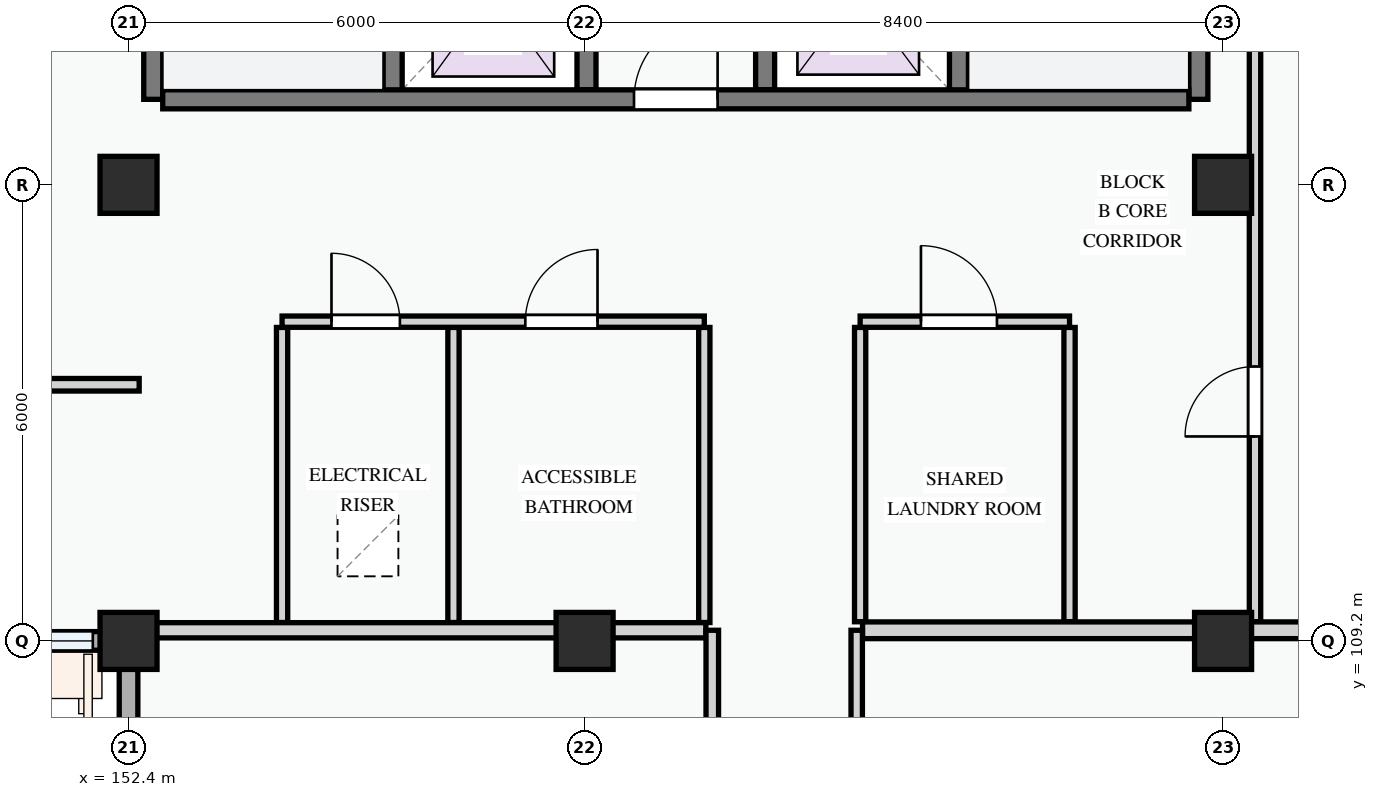
"""IFC4 building model, lengths in metres.
Left out: names, types, materials, properties, quantities, classifications, styles, units other than length and angle.
Written with IfcOpenShell. Run it as: python <this file> out.ifc"""

import sys

from ifc_helpers import new_model, si_unit, direction, frame, frame_2d, origin, origin_2d, place, context, subcontext, project, spatial, rectangle, extrude, element, fill, save


model = new_model("IFC4")
c1 = context("Model", 3, precision=1e-05, world=origin(), true_north=direction((0.0, 1.0)))
c2 = subcontext(c1, "Body", "Model", "MODEL_VIEW")
j1 = project(units=[si_unit("LENGTHUNIT", "METRE"), si_unit("PLANEANGLEUNIT", "RADIAN")], contexts=[c1])
p1 = place(None, origin())
s1 = spatial("IfcSite", under=j1, at=p1, CompositionType="ELEMENT")
p2 = place(p1, origin())
s2 = spatial("IfcBuilding", under=s1, at=p2, CompositionType="ELEMENT")
p3 = place(p2, frame((0.0, 0.0, 4.5)))
s3 = spatial("IfcBuildingStorey", under=s2, at=p3, CompositionType="ELEMENT", Elevation=4.5)
for number, where, z_axis, x_axis in (
    (1, (152.4, 109.2, 0.0), (0.0, 0.0, 1.0), (1.0, 0.0, 0.0)),
    (2, (152.4, 115.2, 0.0), (0.0, 0.0, 1.0), (1.0, 0.0, 0.0)),
    (3, (158.4, 109.2, 0.0), (0.0, 0.0, 1.0), (1.0, 0.0, 0.0)),
    (4, (166.8, 109.2, 0.0), (0.0, 0.0, 1.0), (1.0, 0.0, 0.0)),
    (5, (166.8, 115.2, 0.0), (0.0, 0.0, 1.0), (1.0, 0.0, 0.0)),
):
    element("IfcColumn", number, at=place(p3, frame(where, z_axis=z_axis, x_axis=x_axis)), inside=s3, PredefinedType="COLUMN", context=c2, shape_type="SweptSolid", body=[
        extrude(rectangle(XDim=0.75, YDim=0.75, at=origin_2d()), origin(), (0.0, 0.0, 1.0), 3.6),
    ])
p4 = place(p3, frame((144.0, 109.2, 0.0), z_axis=(0.0, 0.0, 1.0), x_axis=(1.0, 0.0, 0.0)))
e6 = element("IfcWall", 6, at=p4, inside=s3, PredefinedType="STANDARD", context=c2, shape_type="SweptSolid", body=[
    extrude(rectangle(XDim=8.4, YDim=0.245, at=frame_2d((4.2, 0.0))), origin(), (0.0, 0.0, 1.0), 2.675),
])
p5 = place(p4, frame((1.015, 0.0, 0.78)))
e7 = element("IfcOpeningElement", 7, at=p5, cuts=e6, PredefinedType="OPENING", context=c2, shape_type="SweptSolid", body=[
    extrude(rectangle(XDim=1.35, YDim=1.55, at=frame_2d((0.675, 0.775))), frame((0.0, 0.133, 0.0), z_axis=(0.0, -1.0, 0.0), x_axis=(1.0, 0.0, 0.0)), (0.0, 0.0, 1.0), 0.265),
])
p6 = place(p4, frame((3.75, 0.0, 0.78)))
e8 = element("IfcOpeningElement", 8, at=p6, cuts=e6, PredefinedType="OPENING", context=c2, shape_type="SweptSolid", body=[
    extrude(rectangle(XDim=1.6, YDim=1.75, at=frame_2d((0.8, 0.875))), frame((0.0, 0.133, 0.0), z_axis=(0.0, -1.0, 0.0), x_axis=(1.0, 0.0, 0.0)), (0.0, 0.0, 1.0), 0.265),
])
p7 = place(p4, frame((6.33, 0.0, 0.78)))
e9 = element("IfcOpeningElement", 9, at=p7, cuts=e6, PredefinedType="OPENING", context=c2, shape_type="SweptSolid", body=[
    extrude(rectangle(XDim=1.6, YDim=1.75, at=frame_2d((0.8, 0.875))), frame((0.0, 0.133, 0.0), z_axis=(0.0, -1.0, 0.0), x_axis=(1.0, 0.0, 0.0)), (0.0, 0.0, 1.0), 0.265),
])
p8 = place(p3, frame((152.4, 109.2, 0.0), z_axis=(0.0, 0.0, 1.0), x_axis=(0.0, -1.0, 0.0)))
e10 = element("IfcWall", 10, at=p8, inside=s3, PredefinedType="STANDARD", context=c2, shape_type="SweptSolid", body=[
    extrude(rectangle(XDim=8.4, YDim=0.245, at=frame_2d((4.2, 0.0))), origin(), (0.0, 0.0, 1.0), 2.725),
])
p9 = place(p8, frame((1.28, 0.0, 0.78)))
e11 = element("IfcOpeningElement", 11, at=p9, cuts=e10, PredefinedType="OPENING", context=c2, shape_type="SweptSolid", body=[
    extrude(rectangle(XDim=1.9, YDim=1.55, at=frame_2d((0.95, 0.775))), frame((0.0, 0.133, 0.0), z_axis=(0.0, -1.0, 0.0), x_axis=(1.0, 0.0, 0.0)), (0.0, 0.0, 1.0), 0.265),
])
p10 = place(p8, frame((5.095, 0.0, 0.78)))
e12 = element("IfcOpeningElement", 12, at=p10, cuts=e10, PredefinedType="OPENING", context=c2, shape_type="SweptSolid", body=[
    extrude(rectangle(XDim=2.15, YDim=1.65, at=frame_2d((1.075, 0.825))), frame((0.0, 0.133, 0.0), z_axis=(0.0, -1.0, 0.0), x_axis=(1.0, 0.0, 0.0)), (0.0, 0.0, 1.0), 0.265),
])
p11 = place(p3, frame((155.875, 123.25, 0.0), z_axis=(0.0, 0.0, 1.0), x_axis=(0.0, -1.0, 0.0)))
e13 = element("IfcWall", 13, at=p11, inside=s3, PredefinedType="SHEAR", context=c2, shape_type="SweptSolid", body=[
    extrude(rectangle(XDim=6.925, YDim=0.25, at=frame_2d((3.462, 0.0))), origin(), (0.0, 0.0, 1.0), 3.3),
])
p12 = place(p11, frame((0.35, 0.0, 0.0)))
e14 = element("IfcOpeningElement", 14, at=p12, cuts=e13, PredefinedType="OPENING", context=c2, shape_type="SweptSolid", body=[
    extrude(rectangle(XDim=0.95, YDim=2.1, at=frame_2d((0.475, 1.05))), frame((0.0, 0.135, 0.0), z_axis=(0.0, -1.0, 0.0), x_axis=(1.0, 0.0, 0.0)), (0.0, 0.0, 1.0), 0.27),
])
p13 = place(p3, frame((152.725, 123.4, 0.0), z_axis=(0.0, 0.0, 1.0), x_axis=(0.0, -1.0, 0.0)))
e15 = element("IfcWall", 15, at=p13, inside=s3, PredefinedType="SHEAR", context=c2, shape_type="SweptSolid", body=[
    extrude(rectangle(XDim=7.075, YDim=0.25, at=frame_2d((3.538, 0.0))), origin(), (0.0, 0.0, 1.0), 3.3),
])
p14 = place(p3, frame((166.475, 123.25, 0.0), z_axis=(0.0, 0.0, 1.0), x_axis=(0.0, -1.0, 0.0)))
e16 = element("IfcWall", 16, at=p14, inside=s3, PredefinedType="SHEAR", context=c2, shape_type="SweptSolid", body=[
    extrude(rectangle(XDim=6.925, YDim=0.25, at=frame_2d((3.462, 0.0))), origin(), (0.0, 0.0, 1.0), 3.3),
])
p15 = place(p3, frame((163.325, 123.25, 0.0), z_axis=(0.0, 0.0, 1.0), x_axis=(0.0, -1.0, 0.0)))
e17 = element("IfcWall", 17, at=p15, inside=s3, PredefinedType="SHEAR", context=c2, shape_type="SweptSolid", body=[
    extrude(rectangle(XDim=6.925, YDim=0.25, at=frame_2d((3.462, 0.0))), origin(), (0.0, 0.0, 1.0), 3.3),
])
p16 = place(p15, frame((0.35, 0.0, 0.0)))
e18 = element("IfcOpeningElement", 18, at=p16, cuts=e17, PredefinedType="OPENING", context=c2, shape_type="SweptSolid", body=[
    extrude(rectangle(XDim=0.95, YDim=2.1, at=frame_2d((0.475, 1.05))), frame((0.0, 0.135, 0.0), z_axis=(0.0, -1.0, 0.0), x_axis=(1.0, 0.0, 0.0)), (0.0, 0.0, 1.0), 0.27),
])
for number, where, z_axis, x_axis in (
    (19, (158.425, 118.875, 0.0), (0.0, 0.0, 1.0), (0.0, -1.0, 0.0)),
    (20, (160.775, 118.875, 0.0), (0.0, 0.0, 1.0), (0.0, -1.0, 0.0)),
):
    element("IfcWall", number, at=place(p3, frame(where, z_axis=z_axis, x_axis=x_axis)), inside=s3, PredefinedType="SHEAR", context=c2, shape_type="SweptSolid", body=[
        extrude(rectangle(XDim=2.425, YDim=0.25, at=frame_2d((1.212, 0.0))), origin(), (0.0, 0.0, 1.0), 3.3),
    ])
p17 = place(p3, frame((152.85, 116.325, 0.0), z_axis=(0.0, 0.0, 1.0), x_axis=(1.0, 0.0, 0.0)))
e21 = element("IfcWall", 21, at=p17, inside=s3, PredefinedType="SHEAR", context=c2, shape_type="SweptSolid", body=[
    extrude(rectangle(XDim=13.5, YDim=0.25, at=frame_2d((6.75, 0.0))), origin(), (0.0, 0.0, 1.0), 3.3),
])
p18 = place(p17, frame((6.2, 0.0, 0.0)))
e22 = element("IfcOpeningElement", 22, at=p18, cuts=e21, PredefinedType="OPENING", context=c2, shape_type="SweptSolid", body=[
    extrude(rectangle(XDim=1.1, YDim=2.15, at=frame_2d((0.55, 1.075))), frame((0.0, 0.135, 0.0), z_axis=(0.0, -1.0, 0.0), x_axis=(1.0, 0.0, 0.0)), (0.0, 0.0, 1.0), 0.27),
])
for number, where, z_axis, x_axis in (
    (23, (154.42, 113.324, 0.0), (0.0, 0.0, 1.0), (0.0, -1.0, 0.0)),
    (24, (156.675, 113.324, 0.0), (0.0, 0.0, 1.0), (0.0, -1.0, 0.0)),
    (25, (159.975, 113.324, 0.0), (0.0, 0.0, 1.0), (0.0, -1.0, 0.0)),
):
    element("IfcWall", number, at=place(p3, frame(where, z_axis=z_axis, x_axis=x_axis)), inside=s3, PredefinedType="PARTITIONING", context=c2, shape_type="SweptSolid", body=[
        extrude(rectangle(XDim=3.882, YDim=0.148, at=frame_2d((1.941, 0.0))), origin(), (0.0, 0.0, 1.0), 3.3),
    ])
for number, where, z_axis, x_axis in (
    (26, (162.025, 113.324, 0.0), (0.0, 0.0, 1.0), (0.0, -1.0, 0.0)),
    (27, (164.78, 113.324, 0.0), (0.0, 0.0, 1.0), (0.0, -1.0, 0.0)),
):
    element("IfcWall", number, at=place(p3, frame(where, z_axis=z_axis, x_axis=x_axis)), inside=s3, PredefinedType="PARTITIONING", context=c2, shape_type="SweptSolid", body=[
        extrude(rectangle(XDim=3.872, YDim=0.148, at=frame_2d((1.936, 0.0))), origin(), (0.0, 0.0, 1.0), 3.3),
    ])
p19 = place(p3, frame((154.42, 113.4, 0.0), z_axis=(0.0, 0.0, 1.0), x_axis=(1.0, 0.0, 0.0)))
e28 = element("IfcWall", 28, at=p19, inside=s3, PredefinedType="PARTITIONING", context=c2, shape_type="SweptSolid", body=[
    extrude(rectangle(XDim=5.555, YDim=0.148, at=frame_2d((2.778, 0.0))), origin(), (0.0, 0.0, 1.0), 3.3),
])
p20 = place(p19, frame((0.65, 0.0, 0.0)))
e29 = element("IfcOpeningElement", 29, at=p20, cuts=e28, PredefinedType="OPENING", context=c2, shape_type="SweptSolid", body=[
    extrude(rectangle(XDim=0.9, YDim=2.1, at=frame_2d((0.45, 1.05))), frame((0.0, 0.084, 0.0), z_axis=(0.0, -1.0, 0.0), x_axis=(1.0, 0.0, 0.0)), (0.0, 0.0, 1.0), 0.168),
])
p21 = place(p19, frame((3.2, 0.0, 0.0)))
e30 = element("IfcOpeningElement", 30, at=p21, cuts=e28, PredefinedType="OPENING", context=c2, shape_type="SweptSolid", body=[
    extrude(rectangle(XDim=0.95, YDim=2.1, at=frame_2d((0.475, 1.05))), frame((0.0, 0.084, 0.0), z_axis=(0.0, -1.0, 0.0), x_axis=(1.0, 0.0, 0.0)), (0.0, 0.0, 1.0), 0.168),
])
p22 = place(p3, frame((162.025, 113.4, 0.0), z_axis=(0.0, 0.0, 1.0), x_axis=(1.0, 0.0, 0.0)))
e31 = element("IfcWall", 31, at=p22, inside=s3, PredefinedType="PARTITIONING", context=c2, shape_type="SweptSolid", body=[
    extrude(rectangle(XDim=2.755, YDim=0.148, at=frame_2d((1.377, 0.0))), origin(), (0.0, 0.0, 1.0), 3.3),
])
p23 = place(p22, frame((0.8, 0.0, 0.0)))
e32 = element("IfcOpeningElement", 32, at=p23, cuts=e31, PredefinedType="OPENING", context=c2, shape_type="SweptSolid", body=[
    extrude(rectangle(XDim=1.0, YDim=2.15, at=frame_2d((0.5, 1.075))), frame((0.0, 0.084, 0.0), z_axis=(0.0, -1.0, 0.0), x_axis=(1.0, 0.0, 0.0)), (0.0, 0.0, 1.0), 0.168),
])
p24 = place(p3, frame((150.127, 112.57, 0.0), z_axis=(0.0, 0.0, 1.0), x_axis=(1.0, 0.0, 0.0)))
e33 = element("IfcWall", 33, at=p24, inside=s3, PredefinedType="PARTITIONING", context=c2, shape_type="SweptSolid", body=[
    extrude(rectangle(XDim=2.413, YDim=0.165, at=frame_2d((1.207, 0.0))), origin(), (0.0, 0.0, 1.0), 3.3),
])
p25 = place(p3, frame((167.22, 109.452, 0.0), z_axis=(0.0, 0.0, 1.0), x_axis=(0.0, 1.0, 0.0)))
e34 = element("IfcWall", 34, at=p25, inside=s3, PredefinedType="PARTITIONING", context=c2, shape_type="SweptSolid", body=[
    extrude(rectangle(XDim=14.008, YDim=0.15, at=frame_2d((7.004, 0.0))), origin(), (0.0, 0.0, 1.0), 2.725),
])
p26 = place(p25, frame((2.438, 0.0, 0.0)))
e35 = element("IfcOpeningElement", 35, at=p26, cuts=e34, PredefinedType="OPENING", context=c2, shape_type="SweptSolid", body=[
    extrude(rectangle(XDim=0.92, YDim=2.1, at=frame_2d((0.46, 1.05))), frame((0.0, 0.085, 0.0), z_axis=(0.0, -1.0, 0.0), x_axis=(1.0, 0.0, 0.0)), (0.0, 0.0, 1.0), 0.17),
])
p27 = place(p3, frame((152.46, 109.34, 0.0), z_axis=(0.0, 0.0, 1.0), x_axis=(1.0, 0.0, 0.0)))
e36 = element("IfcWall", 36, at=p27, inside=s3, PredefinedType="PARTITIONING", context=c2, shape_type="SweptSolid", body=[
    extrude(rectangle(XDim=7.536, YDim=0.2, at=frame_2d((3.768, 0.0))), origin(), (0.0, 0.0, 1.0), 2.675),
])
p28 = place(p3, frame((162.057, 109.34, 0.0), z_axis=(0.0, 0.0, 1.0), x_axis=(1.0, 0.0, 0.0)))
e37 = element("IfcWall", 37, at=p28, inside=s3, PredefinedType="PARTITIONING", context=c2, shape_type="SweptSolid", body=[
    extrude(rectangle(XDim=11.819, YDim=0.22, at=frame_2d((5.909, 0.0))), origin(), (0.0, 0.0, 1.0), 2.675),
])
p29 = place(p3, frame((160.08, 80.46, 0.0), z_axis=(0.0, 0.0, 1.0), x_axis=(0.0, 1.0, 0.0)))
e38 = element("IfcWall", 38, at=p29, inside=s3, PredefinedType="PARTITIONING", context=c2, shape_type="SweptSolid", body=[
    extrude(rectangle(XDim=28.88, YDim=0.165, at=frame_2d((14.44, 0.0))), origin(), (0.0, 0.0, 1.0), 3.3),
])
p30 = place(p29, frame((2.405, 0.0, 0.0)))
e39 = element("IfcOpeningElement", 39, at=p30, cuts=e38, PredefinedType="OPENING", context=c2, shape_type="SweptSolid", body=[
    extrude(rectangle(XDim=0.95, YDim=2.1, at=frame_2d((0.475, 1.05))), frame((0.0, 0.093, 0.0), z_axis=(0.0, -1.0, 0.0), x_axis=(1.0, 0.0, 0.0)), (0.0, 0.0, 1.0), 0.185),
])
p31 = place(p29, frame((9.708, 0.0, 0.0)))
e40 = element("IfcOpeningElement", 40, at=p31, cuts=e38, PredefinedType="OPENING", context=c2, shape_type="SweptSolid", body=[
    extrude(rectangle(XDim=0.95, YDim=2.1, at=frame_2d((0.475, 1.05))), frame((0.0, 0.093, 0.0), z_axis=(0.0, -1.0, 0.0), x_axis=(1.0, 0.0, 0.0)), (0.0, 0.0, 1.0), 0.185),
])
p32 = place(p29, frame((24.146, 0.0, 0.0)))
e41 = element("IfcOpeningElement", 41, at=p32, cuts=e38, PredefinedType="OPENING", context=c2, shape_type="SweptSolid", body=[
    extrude(rectangle(XDim=0.95, YDim=2.1, at=frame_2d((0.475, 1.05))), frame((0.0, 0.093, 0.0), z_axis=(0.0, -1.0, 0.0), x_axis=(1.0, 0.0, 0.0)), (0.0, 0.0, 1.0), 0.185),
])
p33 = place(p3, frame((161.98, 80.46, 0.0), z_axis=(0.0, 0.0, 1.0), x_axis=(0.0, 1.0, 0.0)))
e42 = element("IfcWall", 42, at=p33, inside=s3, PredefinedType="PARTITIONING", context=c2, shape_type="SweptSolid", body=[
    extrude(rectangle(XDim=28.88, YDim=0.15, at=frame_2d((14.44, 0.0))), origin(), (0.0, 0.0, 1.0), 3.3),
])
p34 = place(p33, frame((2.402, 0.0, 0.0)))
e43 = element("IfcOpeningElement", 43, at=p34, cuts=e42, PredefinedType="OPENING", context=c2, shape_type="SweptSolid", body=[
    extrude(rectangle(XDim=0.92, YDim=2.1, at=frame_2d((0.46, 1.05))), frame((0.0, 0.085, 0.0), z_axis=(0.0, -1.0, 0.0), x_axis=(1.0, 0.0, 0.0)), (0.0, 0.0, 1.0), 0.17),
])
p35 = place(p33, frame((9.705, 0.0, 0.0)))
e44 = element("IfcOpeningElement", 44, at=p35, cuts=e42, PredefinedType="OPENING", context=c2, shape_type="SweptSolid", body=[
    extrude(rectangle(XDim=0.92, YDim=2.1, at=frame_2d((0.46, 1.05))), frame((0.0, 0.085, 0.0), z_axis=(0.0, -1.0, 0.0), x_axis=(1.0, 0.0, 0.0)), (0.0, 0.0, 1.0), 0.17),
])
p36 = place(p33, frame((24.139, 0.0, 0.0)))
e45 = element("IfcOpeningElement", 45, at=p36, cuts=e42, PredefinedType="OPENING", context=c2, shape_type="SweptSolid", body=[
    extrude(rectangle(XDim=0.92, YDim=2.1, at=frame_2d((0.46, 1.05))), frame((0.0, 0.085, 0.0), z_axis=(0.0, -1.0, 0.0), x_axis=(1.0, 0.0, 0.0)), (0.0, 0.0, 1.0), 0.17),
])
p37 = place(p7, origin())
e46 = element("IfcWindow", 46, at=p37, inside=s3, PartitioningType="DOUBLE_PANEL_VERTICAL", PredefinedType="WINDOW", context=c2, shape_type="SweptSolid", body=[
    extrude(rectangle(XDim=1.6, YDim=1.75, at=frame_2d((0.8, 0.875))), frame((0.0, 0.03, 0.0), z_axis=(0.0, -1.0, 0.0), x_axis=(1.0, 0.0, 0.0)), (0.0, 0.0, 1.0), 0.06),
])
fill(e9, e46)
p38 = place(p18, origin())
e47 = element("IfcDoor", 47, at=p38, inside=s3, OperationType="SINGLE_SWING_RIGHT", PredefinedType="DOOR", context=c2, shape_type="SweptSolid", body=[
    extrude(rectangle(XDim=1.1, YDim=2.15, at=frame_2d((0.55, 1.075))), frame((0.0, 0.025, 0.0), z_axis=(0.0, -1.0, 0.0), x_axis=(1.0, 0.0, 0.0)), (0.0, 0.0, 1.0), 0.05),
])
fill(e22, e47)
p39 = place(p20, origin())
e48 = element("IfcDoor", 48, at=p39, inside=s3, OperationType="SINGLE_SWING_LEFT", PredefinedType="DOOR", context=c2, shape_type="SweptSolid", body=[
    extrude(rectangle(XDim=0.9, YDim=2.1, at=frame_2d((0.45, 1.05))), frame((0.0, 0.025, 0.0), z_axis=(0.0, -1.0, 0.0), x_axis=(1.0, 0.0, 0.0)), (0.0, 0.0, 1.0), 0.05),
])
fill(e29, e48)
p40 = place(p21, origin())
e49 = element("IfcDoor", 49, at=p40, inside=s3, OperationType="SINGLE_SWING_RIGHT", PredefinedType="DOOR", context=c2, shape_type="SweptSolid", body=[
    extrude(rectangle(XDim=0.95, YDim=2.1, at=frame_2d((0.475, 1.05))), frame((0.0, 0.025, 0.0), z_axis=(0.0, -1.0, 0.0), x_axis=(1.0, 0.0, 0.0)), (0.0, 0.0, 1.0), 0.05),
])
fill(e30, e49)
p41 = place(p23, origin())
e50 = element("IfcDoor", 50, at=p41, inside=s3, OperationType="SINGLE_SWING_LEFT", PredefinedType="DOOR", context=c2, shape_type="SweptSolid", body=[
    extrude(rectangle(XDim=1.0, YDim=2.15, at=frame_2d((0.5, 1.075))), frame((0.0, 0.025, 0.0), z_axis=(0.0, -1.0, 0.0), x_axis=(1.0, 0.0, 0.0)), (0.0, 0.0, 1.0), 0.05),
])
fill(e32, e50)
p42 = place(p26, origin())
e51 = element("IfcDoor", 51, at=p42, inside=s3, OperationType="SINGLE_SWING_LEFT", PredefinedType="DOOR", context=c2, shape_type="SweptSolid", body=[
    extrude(rectangle(XDim=0.92, YDim=2.1, at=frame_2d((0.46, 1.05))), frame((0.0, 0.025, 0.0), z_axis=(0.0, -1.0, 0.0), x_axis=(1.0, 0.0, 0.0)), (0.0, 0.0, 1.0), 0.05),
])
fill(e35, e51)
save(model, sys.argv[1])
